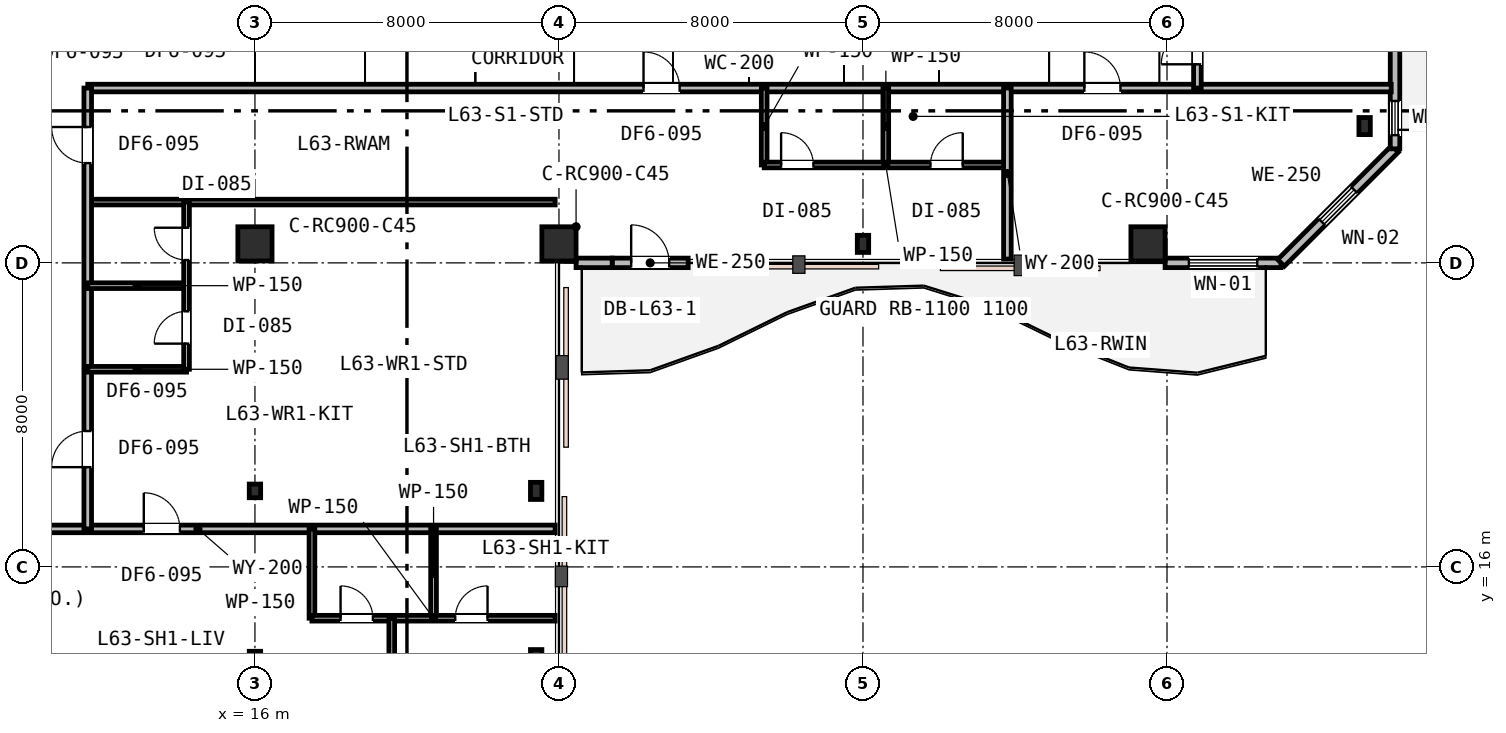
"""IFC4 building model, lengths in metres.
Left out: names, types, materials, properties, quantities, classifications, styles, units other than length and angle.
Written with IfcOpenShell. Run it as: python <this file> out.ifc"""

import sys

from ifc_helpers import new_model, si_unit, direction, frame, frame_2d, origin, origin_2d, place, context, subcontext, project, spatial, rectangle, i_section, extrude, element, fill, save


model = new_model("IFC4")
c1 = context("Model", 3, precision=1e-05, world=origin(), true_north=direction((0.0, 1.0)))
c2 = subcontext(c1, "Body", "Model", "MODEL_VIEW")
j1 = project(units=[si_unit("LENGTHUNIT", "METRE"), si_unit("PLANEANGLEUNIT", "RADIAN")], contexts=[c1])
p1 = place(None, origin())
s1 = spatial("IfcSite", under=j1, at=p1, CompositionType="ELEMENT")
p2 = place(p1, origin())
s2 = spatial("IfcBuilding", under=s1, at=p2, CompositionType="ELEMENT")
p3 = place(p2, frame((0.0, 0.0, 245.0)))
s3 = spatial("IfcBuildingStorey", under=s2, at=p3, CompositionType="ELEMENT", Elevation=245.0)
for number, where, z_axis, x_axis in (
    (1, (16.0, 24.5, 0.0), (0.0, 0.0, 1.0), (1.0, 0.0, 0.0)),
    (2, (24.0, 24.5, 0.0), (0.0, 0.0, 1.0), (1.0, 0.0, 0.0)),
):
    element("IfcColumn", number, at=place(p3, frame(where, z_axis=z_axis, x_axis=x_axis)), inside=s3, PredefinedType="COLUMN", context=c2, shape_type="SweptSolid", body=[
        extrude(rectangle(XDim=0.9, YDim=0.9, at=origin_2d()), origin(), (0.0, 0.0, 1.0), 3.8),
    ])
p4 = place(p3, frame((32.0, 24.5, 0.0), z_axis=(0.0, 0.0, 1.0), x_axis=(1.0, 0.0, 0.0)))
e3 = element("IfcColumn", 3, at=p4, inside=s3, PredefinedType="COLUMN", context=c2, shape_type="SweptSolid", body=[
    extrude(i_section(OverallWidth=0.3, OverallDepth=0.45, WebThickness=0.014, FlangeThickness=0.026, FilletRadius=0.027, at=origin_2d()), origin(), (0.0, 0.0, 1.0), 3.8),
])
p5 = place(p3, frame((39.5, 24.5, 0.0), z_axis=(0.0, 0.0, 1.0), x_axis=(1.0, 0.0, 0.0)))
e4 = element("IfcColumn", 4, at=p5, inside=s3, PredefinedType="COLUMN", context=c2, shape_type="SweptSolid", body=[
    extrude(rectangle(XDim=0.9, YDim=0.9, at=origin_2d()), origin(), (0.0, 0.0, 1.0), 3.8),
])
for number, where, z_axis, x_axis in (
    (5, (45.2, 27.6, 0.0), (0.0, 0.0, 1.0), (1.0, 0.0, 0.0)),
    (6, (23.4, 13.6, 0.0), (0.0, 0.0, 1.0), (1.0, 0.0, 0.0)),
    (7, (23.4, 18.0, 0.0), (0.0, 0.0, 1.0), (1.0, 0.0, 0.0)),
):
    element("IfcColumn", number, at=place(p3, frame(where, z_axis=z_axis, x_axis=x_axis)), inside=s3, PredefinedType="COLUMN", context=c2, shape_type="SweptSolid", body=[
        extrude(i_section(OverallWidth=0.3, OverallDepth=0.45, WebThickness=0.014, FlangeThickness=0.026, FilletRadius=0.027, at=origin_2d()), origin(), (0.0, 0.0, 1.0), 3.8),
    ])
for number, where, z_axis, x_axis in (
    (8, (16.0, 13.6, 0.0), (0.0, 0.0, 1.0), (1.0, 0.0, 0.0)),
    (9, (16.0, 18.0, 0.0), (0.0, 0.0, 1.0), (1.0, 0.0, 0.0)),
):
    element("IfcColumn", number, at=place(p3, frame(where, z_axis=z_axis, x_axis=x_axis)), inside=s3, PredefinedType="COLUMN", context=c2, shape_type="SweptSolid", body=[
        extrude(i_section(OverallWidth=0.3, OverallDepth=0.36, WebThickness=0.013, FlangeThickness=0.022, FilletRadius=0.027, at=origin_2d()), origin(), (0.0, 0.0, 1.0), 3.8),
    ])
p6 = place(p3, frame((25.4, 24.0, 0.0), z_axis=(0.0, 0.0, 1.0), x_axis=(1.0, 0.0, 0.0)))
e10 = element("IfcWall", 10, at=p6, inside=s3, PredefinedType="STANDARD", context=c2, shape_type="SweptSolid", body=[
    extrude(rectangle(XDim=2.0, YDim=0.25, at=frame_2d((1.0, 0.0))), origin(), (0.0, 0.0, 1.0), 3.27),
])
p7 = place(p6, frame((0.5, 0.0, 0.0)))
e11 = element("IfcOpeningElement", 11, at=p7, cuts=e10, PredefinedType="OPENING", context=c2, shape_type="SweptSolid", body=[
    extrude(rectangle(XDim=1.0, YDim=2.15, at=frame_2d((0.5, 1.075))), frame((0.0, 0.135, 0.0), z_axis=(0.0, -1.0, 0.0), x_axis=(1.0, 0.0, 0.0)), (0.0, 0.0, 1.0), 0.27),
])
p8 = place(p3, frame((24.45, 24.0, 0.0), z_axis=(0.0, 0.0, 1.0), x_axis=(1.0, 0.0, 0.0)))
e12 = element("IfcWall", 12, at=p8, inside=s3, PredefinedType="STANDARD", context=c2, shape_type="SweptSolid", body=[
    extrude(rectangle(XDim=0.95, YDim=0.25, at=frame_2d((0.475, 0.0))), origin(), (0.0, 0.0, 1.0), 3.27),
])
p9 = place(p3, frame((39.95, 24.0, 0.0), z_axis=(0.0, 0.0, 1.0), x_axis=(1.0, 0.0, 0.0)))
e13 = element("IfcWall", 13, at=p9, inside=s3, PredefinedType="STANDARD", context=c2, shape_type="SweptSolid", body=[
    extrude(rectangle(XDim=3.05, YDim=0.25, at=frame_2d((1.525, 0.0))), origin(), (0.0, 0.0, 1.0), 3.53),
])
p10 = place(p9, frame((0.625, 0.0, 0.75)))
e14 = element("IfcOpeningElement", 14, at=p10, cuts=e13, PredefinedType="OPENING", context=c2, shape_type="SweptSolid", body=[
    extrude(rectangle(XDim=1.8, YDim=1.85, at=frame_2d((0.9, 0.925))), frame((0.0, 0.135, 0.0), z_axis=(0.0, -1.0, 0.0), x_axis=(1.0, 0.0, 0.0)), (0.0, 0.0, 1.0), 0.27),
])
p11 = place(p3, frame((43.0, 24.0, 0.0), z_axis=(0.0, 0.0, 1.0), x_axis=(0.707106781187, 0.707106781187, 0.0)))
e15 = element("IfcWall", 15, at=p11, inside=s3, PredefinedType="STANDARD", context=c2, shape_type="SweptSolid", body=[
    extrude(rectangle(XDim=4.243, YDim=0.25, at=frame_2d((2.121, 0.0))), origin(), (0.0, 0.0, 1.0), 3.53),
])
p12 = place(p11, frame((1.521, 0.0, 0.85)))
e16 = element("IfcOpeningElement", 16, at=p12, cuts=e15, PredefinedType="OPENING", context=c2, shape_type="SweptSolid", body=[
    extrude(rectangle(XDim=1.2, YDim=1.6, at=frame_2d((0.6, 0.8))), frame((0.0, 0.135, 0.0), z_axis=(0.0, -1.0, 0.0), x_axis=(1.0, 0.0, 0.0)), (0.0, 0.0, 1.0), 0.27),
])
p13 = place(p3, frame((46.0, 27.0, 0.0), z_axis=(0.0, 0.0, 1.0), x_axis=(0.0, 1.0, 0.0)))
e17 = element("IfcWall", 17, at=p13, inside=s3, PredefinedType="STANDARD", context=c2, shape_type="SweptSolid", body=[
    extrude(rectangle(XDim=2.9, YDim=0.25, at=frame_2d((1.45, 0.0))), origin(), (0.0, 0.0, 1.0), 3.53),
])
p14 = place(p13, frame((0.36, 0.0, 0.9)))
e18 = element("IfcOpeningElement", 18, at=p14, cuts=e17, PredefinedType="OPENING", context=c2, shape_type="SweptSolid", body=[
    extrude(rectangle(XDim=0.9, YDim=1.55, at=frame_2d((0.45, 0.775))), frame((0.0, 0.135, 0.0), z_axis=(0.0, -1.0, 0.0), x_axis=(1.0, 0.0, 0.0)), (0.0, 0.0, 1.0), 0.27),
])
p15 = place(p3, frame((11.6, 28.6, 0.0), z_axis=(0.0, 0.0, 1.0), x_axis=(1.0, 0.0, 0.0)))
e19 = element("IfcWall", 19, at=p15, inside=s3, PredefinedType="PARTITIONING", context=c2, shape_type="SweptSolid", body=[
    extrude(rectangle(XDim=34.3, YDim=0.2, at=frame_2d((17.15, 0.0))), origin(), (0.0, 0.0, 1.0), 3.16),
])
p16 = place(p15, frame((14.625, 0.0, 0.0)))
e20 = element("IfcOpeningElement", 20, at=p16, cuts=e19, PredefinedType="OPENING", context=c2, shape_type="SweptSolid", body=[
    extrude(rectangle(XDim=0.95, YDim=2.15, at=frame_2d((0.475, 1.075))), frame((0.0, 0.11, 0.0), z_axis=(0.0, -1.0, 0.0), x_axis=(1.0, 0.0, 0.0)), (0.0, 0.0, 1.0), 0.22),
])
p17 = place(p15, frame((26.225, 0.0, 0.0)))
e21 = element("IfcOpeningElement", 21, at=p17, cuts=e19, PredefinedType="OPENING", context=c2, shape_type="SweptSolid", body=[
    extrude(rectangle(XDim=0.95, YDim=2.15, at=frame_2d((0.475, 1.075))), frame((0.0, 0.11, 0.0), z_axis=(0.0, -1.0, 0.0), x_axis=(1.0, 0.0, 0.0)), (0.0, 0.0, 1.0), 0.22),
])
p18 = place(p3, frame((40.8, 28.6, 0.0), z_axis=(0.0, 0.0, 1.0), x_axis=(0.0, 1.0, 0.0)))
e22 = element("IfcWall", 22, at=p18, inside=s3, PredefinedType="PARTITIONING", context=c2, shape_type="SweptSolid", body=[
    extrude(rectangle(XDim=14.3, YDim=0.2, at=frame_2d((7.15, 0.0))), origin(), (0.0, 0.0, 1.0), 3.16),
])
p19 = place(p18, frame((0.625, 0.0, 0.0)))
e23 = element("IfcOpeningElement", 23, at=p19, cuts=e22, PredefinedType="OPENING", context=c2, shape_type="SweptSolid", body=[
    extrude(rectangle(XDim=0.95, YDim=2.15, at=frame_2d((0.475, 1.075))), frame((0.0, 0.11, 0.0), z_axis=(0.0, -1.0, 0.0), x_axis=(1.0, 0.0, 0.0)), (0.0, 0.0, 1.0), 0.22),
])
p20 = place(p3, frame((29.4, 26.576, 0.0), z_axis=(0.0, 0.0, 1.0), x_axis=(0.0, 1.0, 0.0)))
e24 = element("IfcWall", 24, at=p20, inside=s3, PredefinedType="PARTITIONING", context=c2, shape_type="SweptSolid", body=[
    extrude(rectangle(XDim=2.024, YDim=0.15, at=frame_2d((1.012, 0.0))), origin(), (0.0, 0.0, 1.0), 3.28),
])
p21 = place(p3, frame((32.6, 26.576, 0.0), z_axis=(0.0, 0.0, 1.0), x_axis=(0.0, 1.0, 0.0)))
e25 = element("IfcWall", 25, at=p21, inside=s3, PredefinedType="PARTITIONING", context=c2, shape_type="SweptSolid", body=[
    extrude(rectangle(XDim=2.024, YDim=0.15, at=frame_2d((1.012, 0.0))), origin(), (0.0, 0.0, 1.0), 3.53),
])
p22 = place(p3, frame((29.4, 26.576, 0.0), z_axis=(0.0, 0.0, 1.0), x_axis=(1.0, 0.0, 0.0)))
e26 = element("IfcWall", 26, at=p22, inside=s3, PredefinedType="PARTITIONING", context=c2, shape_type="SweptSolid", body=[
    extrude(rectangle(XDim=6.4, YDim=0.15, at=frame_2d((3.2, 0.0))), origin(), (0.0, 0.0, 1.0), 3.16),
])
p23 = place(p22, frame((0.445, 0.0, 0.0)))
e27 = element("IfcOpeningElement", 27, at=p23, cuts=e26, PredefinedType="OPENING", context=c2, shape_type="SweptSolid", body=[
    extrude(rectangle(XDim=0.85, YDim=2.15, at=frame_2d((0.425, 1.075))), frame((0.0, 0.085, 0.0), z_axis=(0.0, -1.0, 0.0), x_axis=(1.0, 0.0, 0.0)), (0.0, 0.0, 1.0), 0.17),
])
p24 = place(p22, frame((4.375, 0.0, 0.0)))
e28 = element("IfcOpeningElement", 28, at=p24, cuts=e26, PredefinedType="OPENING", context=c2, shape_type="SweptSolid", body=[
    extrude(rectangle(XDim=0.85, YDim=2.15, at=frame_2d((0.425, 1.075))), frame((0.0, 0.085, 0.0), z_axis=(0.0, -1.0, 0.0), x_axis=(1.0, 0.0, 0.0)), (0.0, 0.0, 1.0), 0.17),
])
p25 = place(p3, frame((35.8, 24.1, 0.0), z_axis=(0.0, 0.0, 1.0), x_axis=(0.0, 1.0, 0.0)))
e29 = element("IfcWall", 29, at=p25, inside=s3, PredefinedType="PARTITIONING", context=c2, shape_type="SweptSolid", body=[
    extrude(rectangle(XDim=4.5, YDim=0.2, at=frame_2d((2.25, 0.0))), origin(), (0.0, 0.0, 1.0), 3.27),
])
p26 = place(p3, frame((5.1, 17.0, 0.0), z_axis=(0.0, 0.0, 1.0), x_axis=(1.0, 0.0, 0.0)))
e30 = element("IfcWall", 30, at=p26, inside=s3, PredefinedType="PARTITIONING", context=c2, shape_type="SweptSolid", body=[
    extrude(rectangle(XDim=18.8, YDim=0.2, at=frame_2d((9.4, 0.0))), origin(), (0.0, 0.0, 1.0), 3.16),
])
p27 = place(p26, frame((7.975, 0.0, 0.0)))
e31 = element("IfcOpeningElement", 31, at=p27, cuts=e30, PredefinedType="OPENING", context=c2, shape_type="SweptSolid", body=[
    extrude(rectangle(XDim=0.95, YDim=2.15, at=frame_2d((0.475, 1.075))), frame((0.0, 0.11, 0.0), z_axis=(0.0, -1.0, 0.0), x_axis=(1.0, 0.0, 0.0)), (0.0, 0.0, 1.0), 0.22),
])
p28 = place(p3, frame((11.6, 25.6, 0.0), z_axis=(0.0, 0.0, 1.0), x_axis=(1.0, 0.0, 0.0)))
e32 = element("IfcWall", 32, at=p28, inside=s3, PredefinedType="PARTITIONING", context=c2, shape_type="SweptSolid", body=[
    extrude(rectangle(XDim=12.3, YDim=0.15, at=frame_2d((6.15, 0.0))), origin(), (0.0, 0.0, 1.0), 3.16),
])
p29 = place(p3, frame((11.6, 17.0, 0.0), z_axis=(0.0, 0.0, 1.0), x_axis=(0.0, 1.0, 0.0)))
e33 = element("IfcWall", 33, at=p29, inside=s3, PredefinedType="PARTITIONING", context=c2, shape_type="SweptSolid", body=[
    extrude(rectangle(XDim=11.6, YDim=0.2, at=frame_2d((5.8, 0.0))), origin(), (0.0, 0.0, 1.0), 3.16),
])
p30 = place(p29, frame((9.625, 0.0, 0.0)))
e34 = element("IfcOpeningElement", 34, at=p30, cuts=e33, PredefinedType="OPENING", context=c2, shape_type="SweptSolid", body=[
    extrude(rectangle(XDim=0.95, YDim=2.15, at=frame_2d((0.475, 1.075))), frame((0.0, 0.11, 0.0), z_axis=(0.0, -1.0, 0.0), x_axis=(1.0, 0.0, 0.0)), (0.0, 0.0, 1.0), 0.22),
])
p31 = place(p29, frame((1.625, 0.0, 0.0)))
e35 = element("IfcOpeningElement", 35, at=p31, cuts=e33, PredefinedType="OPENING", context=c2, shape_type="SweptSolid", body=[
    extrude(rectangle(XDim=0.95, YDim=2.15, at=frame_2d((0.475, 1.075))), frame((0.0, 0.11, 0.0), z_axis=(0.0, -1.0, 0.0), x_axis=(1.0, 0.0, 0.0)), (0.0, 0.0, 1.0), 0.22),
])
for number, where, z_axis, x_axis in (
    (36, (11.6, 21.2, 0.0), (0.0, 0.0, 1.0), (1.0, 0.0, 0.0)),
    (37, (11.6, 23.4, 0.0), (0.0, 0.0, 1.0), (1.0, 0.0, 0.0)),
):
    element("IfcWall", number, at=place(p3, frame(where, z_axis=z_axis, x_axis=x_axis)), inside=s3, PredefinedType="PARTITIONING", context=c2, shape_type="SweptSolid", body=[
        extrude(rectangle(XDim=2.6, YDim=0.15, at=frame_2d((1.3, 0.0))), origin(), (0.0, 0.0, 1.0), 3.53),
    ])
p32 = place(p3, frame((14.2, 21.2, 0.0), z_axis=(0.0, 0.0, 1.0), x_axis=(0.0, 1.0, 0.0)))
e38 = element("IfcWall", 38, at=p32, inside=s3, PredefinedType="PARTITIONING", context=c2, shape_type="SweptSolid", body=[
    extrude(rectangle(XDim=4.4, YDim=0.15, at=frame_2d((2.2, 0.0))), origin(), (0.0, 0.0, 1.0), 3.16),
])
p33 = place(p32, frame((0.675, 0.0, 0.0)))
e39 = element("IfcOpeningElement", 39, at=p33, cuts=e38, PredefinedType="OPENING", context=c2, shape_type="SweptSolid", body=[
    extrude(rectangle(XDim=0.85, YDim=2.15, at=frame_2d((0.425, 1.075))), frame((0.0, 0.085, 0.0), z_axis=(0.0, -1.0, 0.0), x_axis=(1.0, 0.0, 0.0)), (0.0, 0.0, 1.0), 0.17),
])
p34 = place(p32, frame((2.875, 0.0, 0.0)))
e40 = element("IfcOpeningElement", 40, at=p34, cuts=e38, PredefinedType="OPENING", context=c2, shape_type="SweptSolid", body=[
    extrude(rectangle(XDim=0.85, YDim=2.15, at=frame_2d((0.425, 1.075))), frame((0.0, 0.085, 0.0), z_axis=(0.0, -1.0, 0.0), x_axis=(1.0, 0.0, 0.0)), (0.0, 0.0, 1.0), 0.17),
])
p35 = place(p3, frame((17.5, 14.65, 0.0), z_axis=(0.0, 0.0, 1.0), x_axis=(0.0, 1.0, 0.0)))
e41 = element("IfcWall", 41, at=p35, inside=s3, PredefinedType="PARTITIONING", context=c2, shape_type="SweptSolid", body=[
    extrude(rectangle(XDim=2.35, YDim=0.15, at=frame_2d((1.175, 0.0))), origin(), (0.0, 0.0, 1.0), 3.53),
])
p36 = place(p3, frame((20.7, 14.65, 0.0), z_axis=(0.0, 0.0, 1.0), x_axis=(0.0, 1.0, 0.0)))
e42 = element("IfcWall", 42, at=p36, inside=s3, PredefinedType="PARTITIONING", context=c2, shape_type="SweptSolid", body=[
    extrude(rectangle(XDim=2.35, YDim=0.15, at=frame_2d((1.175, 0.0))), origin(), (0.0, 0.0, 1.0), 3.28),
])
p37 = place(p3, frame((17.5, 14.65, 0.0), z_axis=(0.0, 0.0, 1.0), x_axis=(1.0, 0.0, 0.0)))
e43 = element("IfcWall", 43, at=p37, inside=s3, PredefinedType="PARTITIONING", context=c2, shape_type="SweptSolid", body=[
    extrude(rectangle(XDim=6.4, YDim=0.15, at=frame_2d((3.2, 0.0))), origin(), (0.0, 0.0, 1.0), 3.27),
])
p38 = place(p37, frame((0.753, 0.0, 0.0)))
e44 = element("IfcOpeningElement", 44, at=p38, cuts=e43, PredefinedType="OPENING", context=c2, shape_type="SweptSolid", body=[
    extrude(rectangle(XDim=0.85, YDim=2.15, at=frame_2d((0.425, 1.075))), frame((0.0, 0.085, 0.0), z_axis=(0.0, -1.0, 0.0), x_axis=(1.0, 0.0, 0.0)), (0.0, 0.0, 1.0), 0.17),
])
p39 = place(p37, frame((3.771, 0.0, 0.0)))
e45 = element("IfcOpeningElement", 45, at=p39, cuts=e43, PredefinedType="OPENING", context=c2, shape_type="SweptSolid", body=[
    extrude(rectangle(XDim=0.85, YDim=2.15, at=frame_2d((0.425, 1.075))), frame((0.0, 0.085, 0.0), z_axis=(0.0, -1.0, 0.0), x_axis=(1.0, 0.0, 0.0)), (0.0, 0.0, 1.0), 0.17),
])
p40 = place(p3, frame((19.6, 10.1, 0.0), z_axis=(0.0, 0.0, 1.0), x_axis=(0.0, 1.0, 0.0)))
e46 = element("IfcWall", 46, at=p40, inside=s3, PredefinedType="PARTITIONING", context=c2, shape_type="SweptSolid", body=[
    extrude(rectangle(XDim=4.55, YDim=0.15, at=frame_2d((2.275, 0.0))), origin(), (0.0, 0.0, 1.0), 3.16),
])
p41 = place(p40, frame((1.825, 0.0, 0.0)))
e47 = element("IfcOpeningElement", 47, at=p41, cuts=e46, PredefinedType="OPENING", context=c2, shape_type="SweptSolid", body=[
    extrude(rectangle(XDim=0.9, YDim=2.15, at=frame_2d((0.45, 1.075))), frame((0.0, 0.085, 0.0), z_axis=(0.0, -1.0, 0.0), x_axis=(1.0, 0.0, 0.0)), (0.0, 0.0, 1.0), 0.17),
])
p42 = place(p7, origin())
e48 = element("IfcDoor", 48, at=p42, inside=s3, OperationType="SINGLE_SWING_LEFT", PredefinedType="DOOR", context=c2, shape_type="SweptSolid", body=[
    extrude(rectangle(XDim=1.0, YDim=2.15, at=frame_2d((0.5, 1.075))), frame((0.0, 0.025, 0.0), z_axis=(0.0, -1.0, 0.0), x_axis=(1.0, 0.0, 0.0)), (0.0, 0.0, 1.0), 0.05),
])
fill(e11, e48)
p43 = place(p10, origin())
e49 = element("IfcWindow", 49, at=p43, inside=s3, PartitioningType="SINGLE_PANEL", PredefinedType="WINDOW", context=c2, shape_type="SweptSolid", body=[
    extrude(rectangle(XDim=1.8, YDim=1.85, at=frame_2d((0.9, 0.925))), frame((0.0, 0.03, 0.0), z_axis=(0.0, -1.0, 0.0), x_axis=(1.0, 0.0, 0.0)), (0.0, 0.0, 1.0), 0.06),
])
fill(e14, e49)
p44 = place(p12, origin())
e50 = element("IfcWindow", 50, at=p44, inside=s3, PartitioningType="SINGLE_PANEL", PredefinedType="WINDOW", context=c2, shape_type="SweptSolid", body=[
    extrude(rectangle(XDim=1.2, YDim=1.6, at=frame_2d((0.6, 0.8))), frame((0.0, 0.03, 0.0), z_axis=(0.0, -1.0, 0.0), x_axis=(1.0, 0.0, 0.0)), (0.0, 0.0, 1.0), 0.06),
])
fill(e16, e50)
p45 = place(p14, origin())
e51 = element("IfcWindow", 51, at=p45, inside=s3, PartitioningType="SINGLE_PANEL", PredefinedType="WINDOW", context=c2, shape_type="SweptSolid", body=[
    extrude(rectangle(XDim=0.9, YDim=1.55, at=frame_2d((0.45, 0.775))), frame((0.0, 0.03, 0.0), z_axis=(0.0, -1.0, 0.0), x_axis=(1.0, 0.0, 0.0)), (0.0, 0.0, 1.0), 0.06),
])
fill(e18, e51)
p46 = place(p19, origin())
e52 = element("IfcDoor", 52, at=p46, inside=s3, OperationType="SINGLE_SWING_LEFT", PredefinedType="DOOR", context=c2, shape_type="SweptSolid", body=[
    extrude(rectangle(XDim=0.95, YDim=2.15, at=frame_2d((0.475, 1.075))), frame((0.0, 0.025, 0.0), z_axis=(0.0, -1.0, 0.0), x_axis=(1.0, 0.0, 0.0)), (0.0, 0.0, 1.0), 0.05),
])
fill(e23, e52)
p47 = place(p16, origin())
e53 = element("IfcDoor", 53, at=p47, inside=s3, OperationType="SINGLE_SWING_LEFT", PredefinedType="DOOR", context=c2, shape_type="SweptSolid", body=[
    extrude(rectangle(XDim=0.95, YDim=2.15, at=frame_2d((0.475, 1.075))), frame((0.0, 0.025, 0.0), z_axis=(0.0, -1.0, 0.0), x_axis=(1.0, 0.0, 0.0)), (0.0, 0.0, 1.0), 0.05),
])
fill(e20, e53)
p48 = place(p23, origin())
e54 = element("IfcDoor", 54, at=p48, inside=s3, OperationType="SINGLE_SWING_LEFT", PredefinedType="DOOR", context=c2, shape_type="SweptSolid", body=[
    extrude(rectangle(XDim=0.85, YDim=2.15, at=frame_2d((0.425, 1.075))), frame((0.0, 0.025, 0.0), z_axis=(0.0, -1.0, 0.0), x_axis=(1.0, 0.0, 0.0)), (0.0, 0.0, 1.0), 0.05),
])
fill(e27, e54)
p49 = place(p24, origin())
e55 = element("IfcDoor", 55, at=p49, inside=s3, OperationType="SINGLE_SWING_RIGHT", PredefinedType="DOOR", context=c2, shape_type="SweptSolid", body=[
    extrude(rectangle(XDim=0.85, YDim=2.15, at=frame_2d((0.425, 1.075))), frame((0.0, 0.025, 0.0), z_axis=(0.0, -1.0, 0.0), x_axis=(1.0, 0.0, 0.0)), (0.0, 0.0, 1.0), 0.05),
])
fill(e28, e55)
p50 = place(p17, origin())
e56 = element("IfcDoor", 56, at=p50, inside=s3, OperationType="SINGLE_SWING_LEFT", PredefinedType="DOOR", context=c2, shape_type="SweptSolid", body=[
    extrude(rectangle(XDim=0.95, YDim=2.15, at=frame_2d((0.475, 1.075))), frame((0.0, 0.025, 0.0), z_axis=(0.0, -1.0, 0.0), x_axis=(1.0, 0.0, 0.0)), (0.0, 0.0, 1.0), 0.05),
])
fill(e21, e56)
p51 = place(p30, origin())
e57 = element("IfcDoor", 57, at=p51, inside=s3, OperationType="SINGLE_SWING_RIGHT", PredefinedType="DOOR", context=c2, shape_type="SweptSolid", body=[
    extrude(rectangle(XDim=0.95, YDim=2.15, at=frame_2d((0.475, 1.075))), frame((0.0, 0.025, 0.0), z_axis=(0.0, -1.0, 0.0), x_axis=(1.0, 0.0, 0.0)), (0.0, 0.0, 1.0), 0.05),
])
fill(e34, e57)
p52 = place(p31, origin())
e58 = element("IfcDoor", 58, at=p52, inside=s3, OperationType="SINGLE_SWING_LEFT", PredefinedType="DOOR", context=c2, shape_type="SweptSolid", body=[
    extrude(rectangle(XDim=0.95, YDim=2.15, at=frame_2d((0.475, 1.075))), frame((0.0, 0.025, 0.0), z_axis=(0.0, -1.0, 0.0), x_axis=(1.0, 0.0, 0.0)), (0.0, 0.0, 1.0), 0.05),
])
fill(e35, e58)
p53 = place(p33, origin())
e59 = element("IfcDoor", 59, at=p53, inside=s3, OperationType="SINGLE_SWING_LEFT", PredefinedType="DOOR", context=c2, shape_type="SweptSolid", body=[
    extrude(rectangle(XDim=0.85, YDim=2.15, at=frame_2d((0.425, 1.075))), frame((0.0, 0.025, 0.0), z_axis=(0.0, -1.0, 0.0), x_axis=(1.0, 0.0, 0.0)), (0.0, 0.0, 1.0), 0.05),
])
fill(e39, e59)
p54 = place(p34, origin())
e60 = element("IfcDoor", 60, at=p54, inside=s3, OperationType="SINGLE_SWING_RIGHT", PredefinedType="DOOR", context=c2, shape_type="SweptSolid", body=[
    extrude(rectangle(XDim=0.85, YDim=2.15, at=frame_2d((0.425, 1.075))), frame((0.0, 0.025, 0.0), z_axis=(0.0, -1.0, 0.0), x_axis=(1.0, 0.0, 0.0)), (0.0, 0.0, 1.0), 0.05),
])
fill(e40, e60)
p55 = place(p27, origin())
e61 = element("IfcDoor", 61, at=p55, inside=s3, OperationType="SINGLE_SWING_LEFT", PredefinedType="DOOR", context=c2, shape_type="SweptSolid", body=[
    extrude(rectangle(XDim=0.95, YDim=2.15, at=frame_2d((0.475, 1.075))), frame((0.0, 0.025, 0.0), z_axis=(0.0, -1.0, 0.0), x_axis=(1.0, 0.0, 0.0)), (0.0, 0.0, 1.0), 0.05),
])
fill(e31, e61)
p56 = place(p38, origin())
e62 = element("IfcDoor", 62, at=p56, inside=s3, OperationType="SINGLE_SWING_LEFT", PredefinedType="DOOR", context=c2, shape_type="SweptSolid", body=[
    extrude(rectangle(XDim=0.85, YDim=2.15, at=frame_2d((0.425, 1.075))), frame((0.0, 0.025, 0.0), z_axis=(0.0, -1.0, 0.0), x_axis=(1.0, 0.0, 0.0)), (0.0, 0.0, 1.0), 0.05),
])
fill(e44, e62)
p57 = place(p39, origin())
e63 = element("IfcDoor", 63, at=p57, inside=s3, OperationType="SINGLE_SWING_RIGHT", PredefinedType="DOOR", context=c2, shape_type="SweptSolid", body=[
    extrude(rectangle(XDim=0.85, YDim=2.15, at=frame_2d((0.425, 1.075))), frame((0.0, 0.025, 0.0), z_axis=(0.0, -1.0, 0.0), x_axis=(1.0, 0.0, 0.0)), (0.0, 0.0, 1.0), 0.05),
])
fill(e45, e63)
save(model, sys.argv[1])
